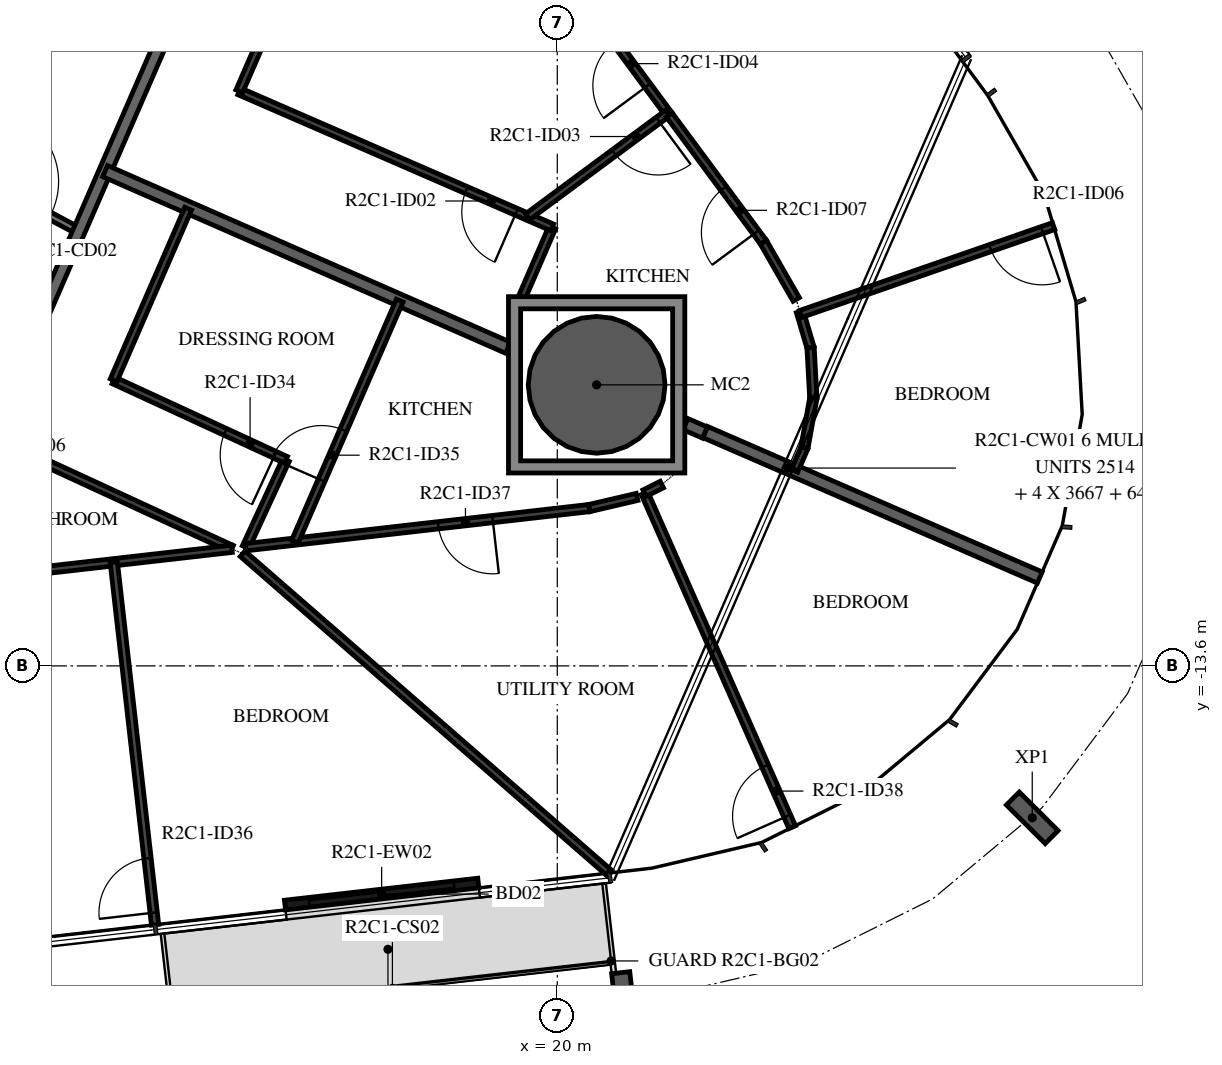
"""IFC4 building model, lengths in metres.
Left out: names, types, materials, properties, quantities, classifications, styles, units other than length and angle.
Written with IfcOpenShell. Run it as: python <this file> out.ifc"""

import sys

from ifc_helpers import new_model, si_unit, direction, frame, frame_2d, origin, origin_2d, place, context, subcontext, project, spatial, polyline, rectangle, hollow_circle, i_section, outline, extrude, element, fill, save


model = new_model("IFC4")
c1 = context("Model", 3, precision=1e-05, world=origin(), true_north=direction((0.0, 1.0)))
c2 = subcontext(c1, "Body", "Model", "MODEL_VIEW")
j1 = project(units=[si_unit("LENGTHUNIT", "METRE"), si_unit("PLANEANGLEUNIT", "RADIAN")], contexts=[c1])
p1 = place(None, origin())
s1 = spatial("IfcSite", under=j1, at=p1, CompositionType="ELEMENT")
p2 = place(p1, origin())
s2 = spatial("IfcBuilding", under=s1, at=p2, CompositionType="ELEMENT")
p3 = place(p2, frame((0.0, 0.0, 101.2)))
s3 = spatial("IfcBuildingStorey", under=s2, at=p3, CompositionType="ELEMENT", Elevation=101.2)
p4 = place(p3, frame((20.648, -8.978, -0.38), z_axis=(0.0, 0.0, 1.0), x_axis=(1.0, 0.0, 0.0)))
e1 = element("IfcColumn", 1, at=p4, inside=s3, PredefinedType="COLUMN", context=c2, shape_type="SweptSolid", body=[
    extrude(hollow_circle(Radius=1.125, WallThickness=0.055, at=origin_2d()), origin(), (0.0, 0.0, 1.0), 3.5),
])
for number, where, z_axis, x_axis in (
    (2, (21.094, -19.092, -0.38), (0.0, 0.0, 1.0), (-0.994, -0.113, 0.0)),
    (3, (27.811, -16.098, -0.38), (0.0, 0.0, 1.0), (-0.705, -0.709, 0.0)),
):
    element("IfcColumn", number, at=place(p3, frame(where, z_axis=z_axis, x_axis=x_axis)), inside=s3, PredefinedType="COLUMN", context=c2, shape_type="SweptSolid", body=[
        extrude(i_section(OverallWidth=0.3, OverallDepth=0.9, WebThickness=0.019, FlangeThickness=0.035, FilletRadius=0.03, at=origin_2d()), origin(), (0.0, 0.0, 1.0), 3.5),
    ])
p5 = place(p3, frame((15.522, -17.533, 0.0), z_axis=(0.0, 0.0, 1.0), x_axis=(0.993578576686, 0.113144208648, 0.0)))
e4 = element("IfcWall", 4, at=p5, inside=s3, PredefinedType="STANDARD", context=c2, shape_type="SweptSolid", body=[
    extrude(rectangle(XDim=3.2, YDim=0.16, at=frame_2d((1.6, 0.0))), origin(), (0.0, 0.0, 1.0), 3.12),
])
p6 = place(p5, frame((0.4, 0.0, 0.0)))
e5 = element("IfcOpeningElement", 5, at=p6, cuts=e4, PredefinedType="OPENING", context=c2, shape_type="SweptSolid", body=[
    extrude(rectangle(XDim=2.4, YDim=2.4, at=frame_2d((1.2, 1.2))), frame((0.0, 0.09, 0.0), z_axis=(0.0, -1.0, 0.0), x_axis=(1.0, 0.0, 0.0)), (0.0, 0.0, 1.0), 0.18),
])
p7 = place(p3, frame((10.858, -4.479, 0.0), z_axis=(0.0, 0.0, 1.0), x_axis=(0.258734743916, 0.965948410781, 0.0)))
e6 = element("IfcWall", 6, at=p7, inside=s3, PredefinedType="SHEAR", context=c2, shape_type="SweptSolid", body=[
    extrude(rectangle(XDim=3.033, YDim=0.5, at=frame_2d((1.516, 0.0))), origin(), (0.0, 0.0, 1.0), 3.12),
])
p8 = place(p3, frame((10.511, -5.589, 0.0), z_axis=(0.0, 0.0, 1.0), x_axis=(0.882962602189, -0.469443333253, 0.0)))
e7 = element("IfcWall", 7, at=p8, inside=s3, PredefinedType="PARTITIONING", context=c2, shape_type="SweptSolid", body=[
    extrude(rectangle(XDim=1.838, YDim=0.12, at=frame_2d((0.919, 0.0))), origin(), (0.0, 0.0, 1.0), 3.12),
])
p9 = place(p8, frame((0.1, 0.0, 0.0)))
e8 = element("IfcOpeningElement", 8, at=p9, cuts=e7, PredefinedType="OPENING", context=c2, shape_type="SweptSolid", body=[
    extrude(rectangle(XDim=1.2, YDim=2.1, at=frame_2d((0.6, 1.05))), frame((0.0, 0.07, 0.0), z_axis=(0.0, -1.0, 0.0), x_axis=(1.0, 0.0, 0.0)), (0.0, 0.0, 1.0), 0.14),
])
p10 = place(p3, frame((11.1, -8.829, 0.0), z_axis=(0.0, 0.0, 1.0), x_axis=(0.398741918631, 0.917063183388, 0.0)))
e9 = element("IfcWall", 9, at=p10, inside=s3, PredefinedType="STANDARD", context=c2, shape_type="SweptSolid", body=[
    extrude(rectangle(XDim=7.342, YDim=0.2, at=frame_2d((3.671, 0.0))), origin(), (0.0, 0.0, 1.0), 3.12),
])
p11 = place(p3, frame((12.564, -5.463, 0.0), z_axis=(0.0, 0.0, 1.0), x_axis=(0.915914014963, -0.401374534812, 0.0)))
e10 = element("IfcWall", 10, at=p11, inside=s3, PredefinedType="STANDARD", context=c2, shape_type="SweptSolid", body=[
    extrude(rectangle(XDim=7.236, YDim=0.2, at=frame_2d((3.618, 0.0))), origin(), (0.0, 0.0, 1.0), 3.12),
])
p12 = place(p3, frame((22.432, -9.754, 0.0), z_axis=(0.0, 0.0, 1.0), x_axis=(0.917071996944, -0.398721647797, 0.0)))
e11 = element("IfcWall", 11, at=p12, inside=s3, PredefinedType="STANDARD", context=c2, shape_type="SweptSolid", body=[
    extrude(rectangle(XDim=6.0, YDim=0.2, at=frame_2d((3.0, 0.0))), origin(), (0.0, 0.0, 1.0), 3.12),
])
p13 = place(p3, frame((22.108, -9.624, 0.0), z_axis=(0.0, 0.0, 1.0), x_axis=(0.917036741673, -0.398802726196, 0.0)))
e12 = element("IfcWall", 12, at=p13, inside=s3, PredefinedType="STANDARD", context=c2, shape_type="SweptSolid", body=[
    extrude(rectangle(XDim=0.35, YDim=0.2, at=frame_2d((0.175, 0.0))), origin(), (0.0, 0.0, 1.0), 3.12),
])
p14 = place(p3, frame((19.423, -7.528, 0.0), z_axis=(0.0, 0.0, 1.0), x_axis=(0.398733304334, 0.917066928863, 0.0)))
e13 = element("IfcWall", 13, at=p14, inside=s3, PredefinedType="PARTITIONING", context=c2, shape_type="SweptSolid", body=[
    extrude(rectangle(XDim=1.241, YDim=0.12, at=frame_2d((0.621, 0.0))), origin(), (0.0, 0.0, 1.0), 3.12),
])
p15 = place(p3, frame((19.918, -6.39, 0.0), z_axis=(0.0, 0.0, 1.0), x_axis=(-0.917051386612, 0.39876904884, 0.0)))
e14 = element("IfcWall", 14, at=p15, inside=s3, PredefinedType="PARTITIONING", context=c2, shape_type="SweptSolid", body=[
    extrude(rectangle(XDim=5.614, YDim=0.12, at=frame_2d((2.807, 0.0))), origin(), (0.0, 0.0, 1.0), 3.12),
])
p16 = place(p15, frame((0.641, 0.0, 0.0)))
e15 = element("IfcOpeningElement", 15, at=p16, cuts=e14, PredefinedType="OPENING", context=c2, shape_type="SweptSolid", body=[
    extrude(rectangle(XDim=0.9, YDim=2.1, at=frame_2d((0.45, 1.05))), frame((0.0, 0.07, 0.0), z_axis=(0.0, -1.0, 0.0), x_axis=(1.0, 0.0, 0.0)), (0.0, 0.0, 1.0), 0.14),
])
p17 = place(p3, frame((14.77, -4.151, 0.0), z_axis=(0.0, 0.0, 1.0), x_axis=(0.39868125503, 0.917089557725, 0.0)))
e16 = element("IfcWall", 16, at=p17, inside=s3, PredefinedType="PARTITIONING", context=c2, shape_type="SweptSolid", body=[
    extrude(rectangle(XDim=1.99, YDim=0.12, at=frame_2d((0.995, 0.0))), origin(), (0.0, 0.0, 1.0), 3.12),
])
p18 = place(p3, frame((21.842, -4.54, 0.0), z_axis=(0.0, 0.0, 1.0), x_axis=(-0.59481744951, 0.803860809941, 0.0)))
e17 = element("IfcWall", 17, at=p18, inside=s3, PredefinedType="PARTITIONING", context=c2, shape_type="SweptSolid", body=[
    extrude(rectangle(XDim=11.976, YDim=0.12, at=frame_2d((5.988, 0.0))), origin(), (0.0, 0.0, 1.0), 3.12),
])
p19 = place(p18, frame((0.6, 0.0, 0.0)))
e18 = element("IfcOpeningElement", 18, at=p19, cuts=e17, PredefinedType="OPENING", context=c2, shape_type="SweptSolid", body=[
    extrude(rectangle(XDim=0.9, YDim=2.1, at=frame_2d((0.45, 1.05))), frame((0.0, 0.07, 0.0), z_axis=(0.0, -1.0, 0.0), x_axis=(1.0, 0.0, 0.0)), (0.0, 0.0, 1.0), 0.14),
])
p20 = place(p3, frame((23.99, -7.775, 0.0), z_axis=(0.0, 0.0, 1.0), x_axis=(0.284088329691, -0.958798112708, 0.0)))
e19 = element("IfcWall", 19, at=p20, inside=s3, PredefinedType="PARTITIONING", context=c2, shape_type="SweptSolid", body=[
    extrude(rectangle(XDim=0.619, YDim=0.12, at=frame_2d((0.309, 0.0))), origin(), (0.0, 0.0, 1.0), 3.12),
])
for number, where, z_axis, x_axis in (
    (20, (24.165, -8.368, 0.0), (0.0, 0.0, 1.0), (0.055, -0.998, 0.0)),
    (21, (24.211, -9.196, 0.0), (0.0, 0.0, 1.0), (-0.176, -0.984, 0.0)),
):
    element("IfcWall", number, at=place(p3, frame(where, z_axis=z_axis, x_axis=x_axis)), inside=s3, PredefinedType="PARTITIONING", context=c2, shape_type="SweptSolid", body=[
        extrude(rectangle(XDim=0.829, YDim=0.12, at=frame_2d((0.415, 0.0))), origin(), (0.0, 0.0, 1.0), 3.12),
    ])
p21 = place(p3, frame((24.065, -10.012, 0.0), z_axis=(0.0, 0.0, 1.0), x_axis=(-0.398747648376, -0.917060692056, 0.0)))
e22 = element("IfcWall", 22, at=p21, inside=s3, PredefinedType="PARTITIONING", context=c2, shape_type="SweptSolid", body=[
    extrude(rectangle(XDim=0.415, YDim=0.12, at=frame_2d((0.207, 0.0))), origin(), (0.0, 0.0, 1.0), 3.12),
])
p22 = place(p3, frame((28.162, -6.368, 0.0), z_axis=(0.0, 0.0, 1.0), x_axis=(-0.94463429878, -0.328125039534, 0.0)))
e23 = element("IfcWall", 23, at=p22, inside=s3, PredefinedType="PARTITIONING", context=c2, shape_type="SweptSolid", body=[
    extrude(rectangle(XDim=4.405, YDim=0.12, at=frame_2d((2.202, 0.0))), origin(), (0.0, 0.0, 1.0), 3.12),
])
p23 = place(p22, frame((0.2, 0.0, 0.0)))
e24 = element("IfcOpeningElement", 24, at=p23, cuts=e23, PredefinedType="OPENING", context=c2, shape_type="SweptSolid", body=[
    extrude(rectangle(XDim=0.9, YDim=2.1, at=frame_2d((0.45, 1.05))), frame((0.0, 0.07, 0.0), z_axis=(0.0, -1.0, 0.0), x_axis=(1.0, 0.0, 0.0)), (0.0, 0.0, 1.0), 0.14),
])
p24 = place(p3, frame((21.818, -4.508, 0.0), z_axis=(0.0, 0.0, 1.0), x_axis=(-0.803875276339, -0.594797898526, 0.0)))
e25 = element("IfcWall", 25, at=p24, inside=s3, PredefinedType="PARTITIONING", context=c2, shape_type="SweptSolid", body=[
    extrude(rectangle(XDim=2.868, YDim=0.12, at=frame_2d((1.434, 0.0))), origin(), (0.0, 0.0, 1.0), 3.12),
])
p25 = place(p24, frame((0.2, 0.0, 0.0)))
e26 = element("IfcOpeningElement", 26, at=p25, cuts=e25, PredefinedType="OPENING", context=c2, shape_type="SweptSolid", body=[
    extrude(rectangle(XDim=0.9, YDim=2.1, at=frame_2d((0.45, 1.05))), frame((0.0, 0.07, 0.0), z_axis=(0.0, -1.0, 0.0), x_axis=(1.0, 0.0, 0.0)), (0.0, 0.0, 1.0), 0.14),
])
p26 = place(p3, frame((23.93, -7.573, 0.0), z_axis=(0.0, 0.0, 1.0), x_axis=(-0.497348044937, 0.867551106389, 0.0)))
e27 = element("IfcWall", 27, at=p26, inside=s3, PredefinedType="PARTITIONING", context=c2, shape_type="SweptSolid", body=[
    extrude(rectangle(XDim=1.087, YDim=0.12, at=frame_2d((0.543, 0.0))), origin(), (0.0, 0.0, 1.0), 3.12),
])
p27 = place(p3, frame((23.389, -6.631, 0.0), z_axis=(0.0, 0.0, 1.0), x_axis=(-0.594821170528, 0.803858056557, 0.0)))
e28 = element("IfcWall", 28, at=p27, inside=s3, PredefinedType="PARTITIONING", context=c2, shape_type="SweptSolid", body=[
    extrude(rectangle(XDim=2.601, YDim=0.12, at=frame_2d((1.301, 0.0))), origin(), (0.0, 0.0, 1.0), 3.12),
])
p28 = place(p27, frame((0.2, 0.0, 0.0)))
e29 = element("IfcOpeningElement", 29, at=p28, cuts=e28, PredefinedType="OPENING", context=c2, shape_type="SweptSolid", body=[
    extrude(rectangle(XDim=0.9, YDim=2.1, at=frame_2d((0.45, 1.05))), frame((0.0, 0.07, 0.0), z_axis=(0.0, -1.0, 0.0), x_axis=(1.0, 0.0, 0.0)), (0.0, 0.0, 1.0), 0.14),
])
p29 = place(p3, frame((11.649, -10.289, 0.0), z_axis=(0.0, 0.0, 1.0), x_axis=(0.9079269461, -0.419128453514, 0.0)))
e30 = element("IfcWall", 30, at=p29, inside=s3, PredefinedType="PARTITIONING", context=c2, shape_type="SweptSolid", body=[
    extrude(rectangle(XDim=3.304, YDim=0.12, at=frame_2d((1.652, 0.0))), origin(), (0.0, 0.0, 1.0), 3.12),
])
p30 = place(p3, frame((14.875, -11.648, 0.0), z_axis=(0.0, 0.0, 1.0), x_axis=(0.419087543301, 0.90794583046, 0.0)))
e31 = element("IfcWall", 31, at=p30, inside=s3, PredefinedType="PARTITIONING", context=c2, shape_type="SweptSolid", body=[
    extrude(rectangle(XDim=1.582, YDim=0.12, at=frame_2d((0.791, 0.0))), origin(), (0.0, 0.0, 1.0), 3.12),
])
p31 = place(p3, frame((15.538, -10.212, 0.0), z_axis=(0.0, 0.0, 1.0), x_axis=(-0.907941075756, 0.419097844131, 0.0)))
e32 = element("IfcWall", 32, at=p31, inside=s3, PredefinedType="PARTITIONING", context=c2, shape_type="SweptSolid", body=[
    extrude(rectangle(XDim=3.122, YDim=0.12, at=frame_2d((1.561, 0.0))), origin(), (0.0, 0.0, 1.0), 3.12),
])
p32 = place(p31, frame((0.2, 0.0, 0.0)))
e33 = element("IfcOpeningElement", 33, at=p32, cuts=e32, PredefinedType="OPENING", context=c2, shape_type="SweptSolid", body=[
    extrude(rectangle(XDim=0.9, YDim=2.1, at=frame_2d((0.45, 1.05))), frame((0.0, 0.07, 0.0), z_axis=(0.0, -1.0, 0.0), x_axis=(1.0, 0.0, 0.0)), (0.0, 0.0, 1.0), 0.14),
])
p33 = place(p3, frame((12.703, -8.904, 0.0), z_axis=(0.0, 0.0, 1.0), x_axis=(0.398679720725, 0.917090224723, 0.0)))
e34 = element("IfcWall", 34, at=p33, inside=s3, PredefinedType="PARTITIONING", context=c2, shape_type="SweptSolid", body=[
    extrude(rectangle(XDim=3.079, YDim=0.12, at=frame_2d((1.54, 0.0))), origin(), (0.0, 0.0, 1.0), 3.12),
])
p34 = place(p3, frame((14.649, -11.674, 0.0), z_axis=(0.0, 0.0, 1.0), x_axis=(-0.993573746873, -0.113186613721, 0.0)))
e35 = element("IfcWall", 35, at=p34, inside=s3, PredefinedType="PARTITIONING", context=c2, shape_type="SweptSolid", body=[
    extrude(rectangle(XDim=5.796, YDim=0.12, at=frame_2d((2.898, 0.0))), origin(), (0.0, 0.0, 1.0), 3.12),
])
p35 = place(p3, frame((13.386, -17.857, 0.0), z_axis=(0.0, 0.0, 1.0), x_axis=(-0.113200012983, 0.993572220355, 0.0)))
e36 = element("IfcWall", 36, at=p35, inside=s3, PredefinedType="PARTITIONING", context=c2, shape_type="SweptSolid", body=[
    extrude(rectangle(XDim=6.0, YDim=0.12, at=frame_2d((3.0, 0.0))), origin(), (0.0, 0.0, 1.0), 2.73),
])
p36 = place(p35, frame((0.2, 0.0, 0.0)))
e37 = element("IfcOpeningElement", 37, at=p36, cuts=e36, PredefinedType="OPENING", context=c2, shape_type="SweptSolid", body=[
    extrude(rectangle(XDim=0.9, YDim=2.1, at=frame_2d((0.45, 1.05))), frame((0.0, 0.07, 0.0), z_axis=(0.0, -1.0, 0.0), x_axis=(1.0, 0.0, 0.0)), (0.0, 0.0, 1.0), 0.14),
])
p37 = place(p3, frame((20.856, -17.006, 0.0), z_axis=(0.0, 0.0, 1.0), x_axis=(-0.75423134567, 0.656608770281, 0.0)))
e38 = element("IfcWall", 38, at=p37, inside=s3, PredefinedType="PARTITIONING", context=c2, shape_type="SweptSolid", body=[
    extrude(rectangle(XDim=7.995, YDim=0.12, at=frame_2d((3.998, 0.0))), origin(), (0.0, 0.0, 1.0), 3.12),
])
p38 = place(p3, frame((20.527, -11.004, 0.0), z_axis=(0.0, 0.0, 1.0), x_axis=(-0.993568869194, -0.113229422712, 0.0)))
e39 = element("IfcWall", 39, at=p38, inside=s3, PredefinedType="PARTITIONING", context=c2, shape_type="SweptSolid", body=[
    extrude(rectangle(XDim=5.688, YDim=0.12, at=frame_2d((2.844, 0.0))), origin(), (0.0, 0.0, 1.0), 3.12),
])
p39 = place(p38, frame((1.6, 0.0, 0.0)))
e40 = element("IfcOpeningElement", 40, at=p39, cuts=e39, PredefinedType="OPENING", context=c2, shape_type="SweptSolid", body=[
    extrude(rectangle(XDim=0.9, YDim=2.1, at=frame_2d((0.45, 1.05))), frame((0.0, 0.07, 0.0), z_axis=(0.0, -1.0, 0.0), x_axis=(1.0, 0.0, 0.0)), (0.0, 0.0, 1.0), 0.14),
])
p40 = place(p3, frame((21.312, -10.821, 0.0), z_axis=(0.0, 0.0, 1.0), x_axis=(-0.973765266404, -0.227554841621, 0.0)))
e41 = element("IfcWall", 41, at=p40, inside=s3, PredefinedType="PARTITIONING", context=c2, shape_type="SweptSolid", body=[
    extrude(rectangle(XDim=0.807, YDim=0.12, at=frame_2d((0.403, 0.0))), origin(), (0.0, 0.0, 1.0), 3.12),
])
p41 = place(p3, frame((23.864, -16.253, 0.0), z_axis=(0.0, 0.0, 1.0), x_axis=(-0.404274566917, 0.914637673915, 0.0)))
e42 = element("IfcWall", 42, at=p41, inside=s3, PredefinedType="PARTITIONING", context=c2, shape_type="SweptSolid", body=[
    extrude(rectangle(XDim=6.006, YDim=0.12, at=frame_2d((3.003, 0.0))), origin(), (0.0, 0.0, 1.0), 3.12),
])
p42 = place(p41, frame((0.2, 0.0, 0.0)))
e43 = element("IfcOpeningElement", 43, at=p42, cuts=e42, PredefinedType="OPENING", context=c2, shape_type="SweptSolid", body=[
    extrude(rectangle(XDim=0.9, YDim=2.1, at=frame_2d((0.45, 1.05))), frame((0.0, 0.07, 0.0), z_axis=(0.0, -1.0, 0.0), x_axis=(1.0, 0.0, 0.0)), (0.0, 0.0, 1.0), 0.14),
])
p43 = place(p3, frame((15.686, -11.556, 0.0), z_axis=(0.0, 0.0, 1.0), x_axis=(0.398740569839, 0.917063769846, 0.0)))
e44 = element("IfcWall", 44, at=p43, inside=s3, PredefinedType="PARTITIONING", context=c2, shape_type="SweptSolid", body=[
    extrude(rectangle(XDim=4.322, YDim=0.12, at=frame_2d((2.161, 0.0))), origin(), (0.0, 0.0, 1.0), 3.12),
])
p44 = place(p43, frame((1.1, 0.0, 0.0)))
e45 = element("IfcOpeningElement", 45, at=p44, cuts=e44, PredefinedType="OPENING", context=c2, shape_type="SweptSolid", body=[
    extrude(rectangle(XDim=0.9, YDim=2.1, at=frame_2d((0.45, 1.05))), frame((0.0, 0.07, 0.0), z_axis=(0.0, -1.0, 0.0), x_axis=(1.0, 0.0, 0.0)), (0.0, 0.0, 1.0), 0.14),
])
p45 = place(p3, frame((21.435, -10.76, 0.0), z_axis=(0.0, 0.0, 1.0), x_axis=(0.895041493646, 0.445982874841, 0.0)))
e46 = element("IfcWall", 46, at=p45, inside=s3, PredefinedType="PARTITIONING", context=c2, shape_type="SweptSolid", body=[
    extrude(rectangle(XDim=0.317, YDim=0.12, at=frame_2d((0.159, 0.0))), origin(), (0.0, 0.0, 1.0), 3.12),
])
p46 = place(p3, origin())
e47 = element("IfcWall", 47, at=p46, inside=s3, PredefinedType="STANDARD", context=c2, shape_type="SweptSolid", body=[
    extrude(outline(polyline([(22.098, -7.528), (22.098, -10.428), (19.198, -10.428), (19.198, -7.528), (22.098, -7.528)]), holes=[polyline([(19.398, -10.228), (21.898, -10.228), (21.898, -7.728), (19.398, -7.728), (19.398, -10.228)])]), origin(), (0.0, 0.0, 1.0), 3.12),
])
p47 = place(p6, origin())
e48 = element("IfcDoor", 48, at=p47, inside=s3, OperationType="DOUBLE_DOOR_SLIDING", PredefinedType="DOOR", context=c2, shape_type="SweptSolid", body=[
    extrude(rectangle(XDim=2.4, YDim=2.4, at=frame_2d((1.2, 1.2))), frame((0.0, 0.025, 0.0), z_axis=(0.0, -1.0, 0.0), x_axis=(1.0, 0.0, 0.0)), (0.0, 0.0, 1.0), 0.05),
])
fill(e5, e48)
p48 = place(p16, origin())
e49 = element("IfcDoor", 49, at=p48, inside=s3, OperationType="SINGLE_SWING_LEFT", PredefinedType="DOOR", context=c2, shape_type="SweptSolid", body=[
    extrude(rectangle(XDim=0.9, YDim=2.1, at=frame_2d((0.45, 1.05))), frame((0.0, 0.025, 0.0), z_axis=(0.0, -1.0, 0.0), x_axis=(1.0, 0.0, 0.0)), (0.0, 0.0, 1.0), 0.05),
])
fill(e15, e49)
p49 = place(p25, origin())
e50 = element("IfcDoor", 50, at=p49, inside=s3, OperationType="SINGLE_SWING_LEFT", PredefinedType="DOOR", context=c2, shape_type="SweptSolid", body=[
    extrude(rectangle(XDim=0.9, YDim=2.1, at=frame_2d((0.45, 1.05))), frame((0.0, 0.025, 0.0), z_axis=(0.0, -1.0, 0.0), x_axis=(1.0, 0.0, 0.0)), (0.0, 0.0, 1.0), 0.05),
])
fill(e26, e50)
p50 = place(p19, origin())
e51 = element("IfcDoor", 51, at=p50, inside=s3, OperationType="SINGLE_SWING_LEFT", PredefinedType="DOOR", context=c2, shape_type="SweptSolid", body=[
    extrude(rectangle(XDim=0.9, YDim=2.1, at=frame_2d((0.45, 1.05))), frame((0.0, 0.025, 0.0), z_axis=(0.0, -1.0, 0.0), x_axis=(1.0, 0.0, 0.0)), (0.0, 0.0, 1.0), 0.05),
])
fill(e18, e51)
p51 = place(p23, origin())
e52 = element("IfcDoor", 52, at=p51, inside=s3, OperationType="SINGLE_SWING_LEFT", PredefinedType="DOOR", context=c2, shape_type="SweptSolid", body=[
    extrude(rectangle(XDim=0.9, YDim=2.1, at=frame_2d((0.45, 1.05))), frame((0.0, 0.025, 0.0), z_axis=(0.0, -1.0, 0.0), x_axis=(1.0, 0.0, 0.0)), (0.0, 0.0, 1.0), 0.05),
])
fill(e24, e52)
p52 = place(p28, origin())
e53 = element("IfcDoor", 53, at=p52, inside=s3, OperationType="SINGLE_SWING_RIGHT", PredefinedType="DOOR", context=c2, shape_type="SweptSolid", body=[
    extrude(rectangle(XDim=0.9, YDim=2.1, at=frame_2d((0.45, 1.05))), frame((0.0, 0.025, 0.0), z_axis=(0.0, -1.0, 0.0), x_axis=(1.0, 0.0, 0.0)), (0.0, 0.0, 1.0), 0.05),
])
fill(e29, e53)
p53 = place(p32, origin())
e54 = element("IfcDoor", 54, at=p53, inside=s3, OperationType="SINGLE_SWING_LEFT", PredefinedType="DOOR", context=c2, shape_type="SweptSolid", body=[
    extrude(rectangle(XDim=0.9, YDim=2.1, at=frame_2d((0.45, 1.05))), frame((0.0, 0.025, 0.0), z_axis=(0.0, -1.0, 0.0), x_axis=(1.0, 0.0, 0.0)), (0.0, 0.0, 1.0), 0.05),
])
fill(e33, e54)
p54 = place(p44, origin())
e55 = element("IfcDoor", 55, at=p54, inside=s3, OperationType="SINGLE_SWING_RIGHT", PredefinedType="DOOR", context=c2, shape_type="SweptSolid", body=[
    extrude(rectangle(XDim=0.9, YDim=2.1, at=frame_2d((0.45, 1.05))), frame((0.0, 0.025, 0.0), z_axis=(0.0, -1.0, 0.0), x_axis=(1.0, 0.0, 0.0)), (0.0, 0.0, 1.0), 0.05),
])
fill(e45, e55)
p55 = place(p36, origin())
e56 = element("IfcDoor", 56, at=p55, inside=s3, OperationType="SINGLE_SWING_RIGHT", PredefinedType="DOOR", context=c2, shape_type="SweptSolid", body=[
    extrude(rectangle(XDim=0.9, YDim=2.1, at=frame_2d((0.45, 1.05))), frame((0.0, 0.025, 0.0), z_axis=(0.0, -1.0, 0.0), x_axis=(1.0, 0.0, 0.0)), (0.0, 0.0, 1.0), 0.05),
])
fill(e37, e56)
p56 = place(p39, origin())
e57 = element("IfcDoor", 57, at=p56, inside=s3, OperationType="SINGLE_SWING_RIGHT", PredefinedType="DOOR", context=c2, shape_type="SweptSolid", body=[
    extrude(rectangle(XDim=0.9, YDim=2.1, at=frame_2d((0.45, 1.05))), frame((0.0, 0.025, 0.0), z_axis=(0.0, -1.0, 0.0), x_axis=(1.0, 0.0, 0.0)), (0.0, 0.0, 1.0), 0.05),
])
fill(e40, e57)
p57 = place(p42, origin())
e58 = element("IfcDoor", 58, at=p57, inside=s3, OperationType="SINGLE_SWING_RIGHT", PredefinedType="DOOR", context=c2, shape_type="SweptSolid", body=[
    extrude(rectangle(XDim=0.9, YDim=2.1, at=frame_2d((0.45, 1.05))), frame((0.0, 0.025, 0.0), z_axis=(0.0, -1.0, 0.0), x_axis=(1.0, 0.0, 0.0)), (0.0, 0.0, 1.0), 0.05),
])
fill(e43, e58)
save(model, sys.argv[1])
